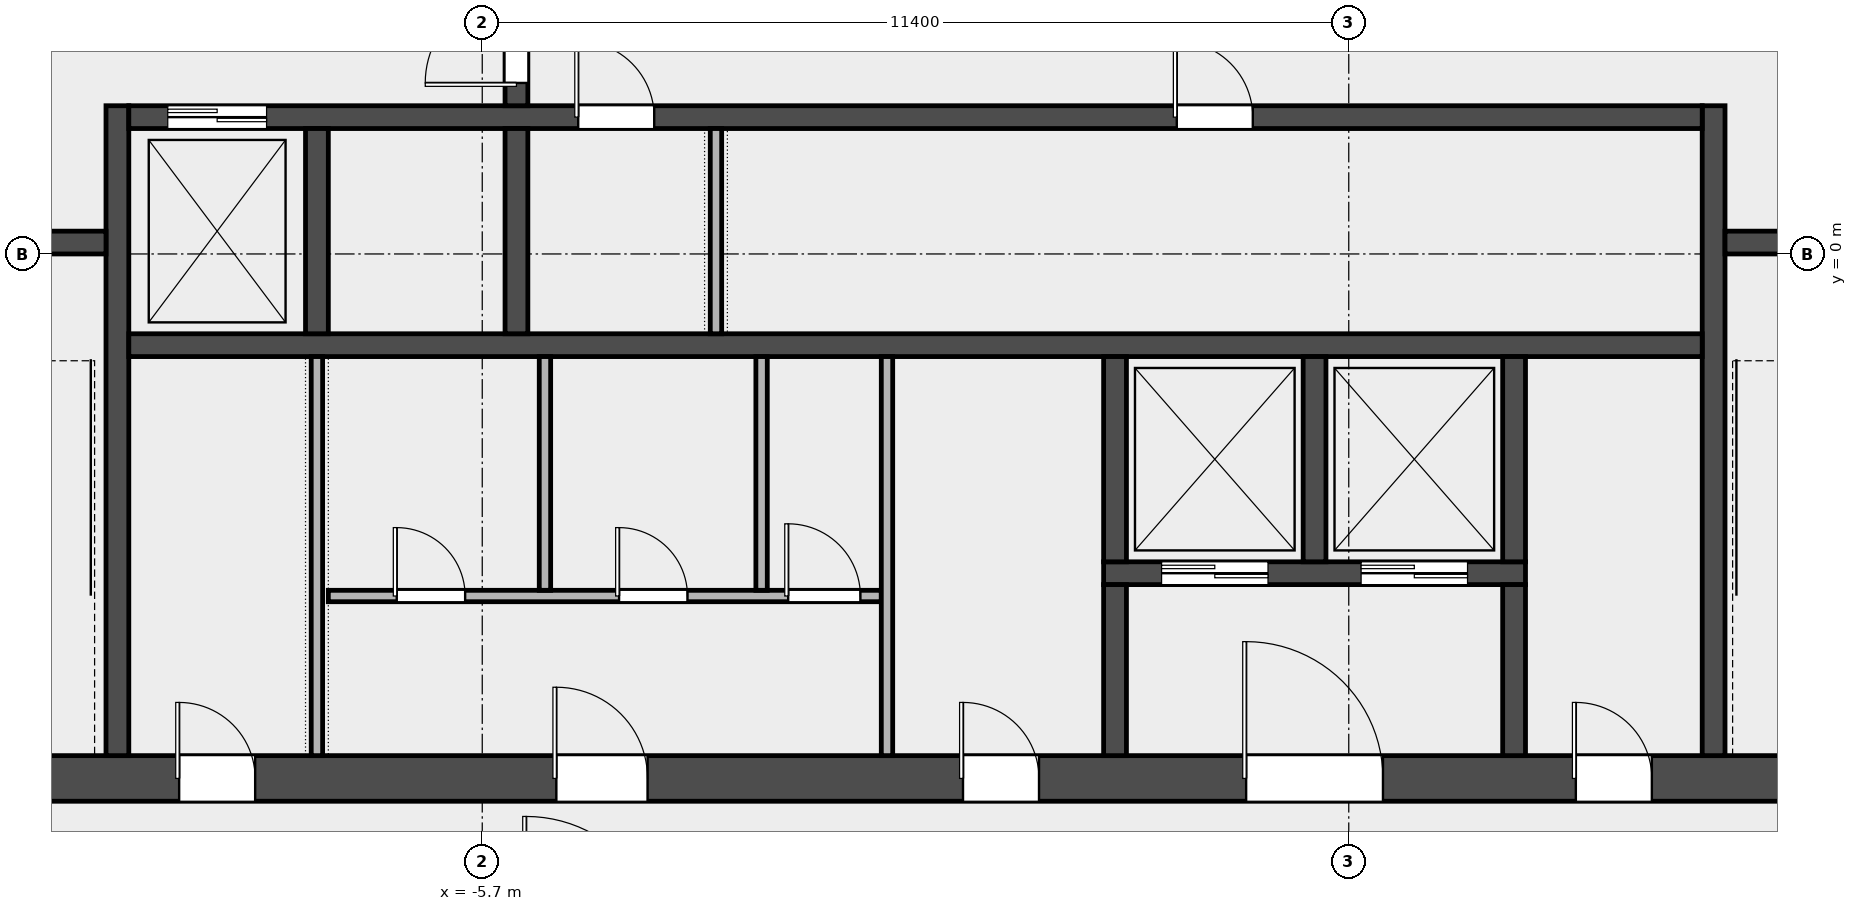
"""IFC4 building model, lengths in metres.
Left out: names, types, materials, properties, quantities, classifications, styles, units other than length and angle.
Written with IfcOpenShell. Run it as: python <this file> out.ifc"""

import sys

from ifc_helpers import new_model, si_unit, direction, frame, frame_2d, origin, place, context, subcontext, project, spatial, rectangle, extrude, element, fill, save


model = new_model("IFC4")
c1 = context("Model", 3, precision=1e-05, world=origin(), true_north=direction((0.0, 1.0)))
c2 = subcontext(c1, "Body", "Model", "MODEL_VIEW")
j1 = project(units=[si_unit("LENGTHUNIT", "METRE"), si_unit("PLANEANGLEUNIT", "RADIAN")], contexts=[c1])
p1 = place(None, origin())
s1 = spatial("IfcSite", under=j1, at=p1, CompositionType="ELEMENT")
p2 = place(p1, origin())
s2 = spatial("IfcBuilding", under=s1, at=p2, CompositionType="ELEMENT")
p3 = place(p2, frame((0.0, 0.0, 329.4)))
s3 = spatial("IfcBuildingStorey", under=s2, at=p3, CompositionType="ELEMENT", Elevation=329.4)
p4 = place(p3, frame((-14.4, -6.9, 0.0), z_axis=(0.0, 0.0, 1.0), x_axis=(1.0, 0.0, 0.0)))
e1 = element("IfcWall", 1, at=p4, inside=s3, PredefinedType="SHEAR", context=c2, shape_type="SweptSolid", body=[
    extrude(rectangle(XDim=28.8, YDim=0.6, at=frame_2d((14.4, 0.0))), origin(), (0.0, 0.0, 1.0), 3.7),
])
p5 = place(p4, frame((4.712, 0.0, 0.0)))
e2 = element("IfcOpeningElement", 2, at=p5, cuts=e1, PredefinedType="OPENING", context=c2, shape_type="SweptSolid", body=[
    extrude(rectangle(XDim=1.0, YDim=2.1, at=frame_2d((0.5, 1.05))), frame((0.0, 0.312, 0.0), z_axis=(0.0, -1.0, 0.0), x_axis=(1.0, 0.0, 0.0)), (0.0, 0.0, 1.0), 0.624),
])
p6 = place(p4, frame((9.675, 0.0, 0.0)))
e3 = element("IfcOpeningElement", 3, at=p6, cuts=e1, PredefinedType="OPENING", context=c2, shape_type="SweptSolid", body=[
    extrude(rectangle(XDim=1.2, YDim=2.1, at=frame_2d((0.6, 1.05))), frame((0.0, 0.312, 0.0), z_axis=(0.0, -1.0, 0.0), x_axis=(1.0, 0.0, 0.0)), (0.0, 0.0, 1.0), 0.624),
])
p7 = place(p4, frame((15.025, 0.0, 0.0)))
e4 = element("IfcOpeningElement", 4, at=p7, cuts=e1, PredefinedType="OPENING", context=c2, shape_type="SweptSolid", body=[
    extrude(rectangle(XDim=1.0, YDim=2.1, at=frame_2d((0.5, 1.05))), frame((0.0, 0.312, 0.0), z_axis=(0.0, -1.0, 0.0), x_axis=(1.0, 0.0, 0.0)), (0.0, 0.0, 1.0), 0.624),
])
p8 = place(p4, frame((18.75, 0.0, 0.0)))
e5 = element("IfcOpeningElement", 5, at=p8, cuts=e1, PredefinedType="OPENING", context=c2, shape_type="SweptSolid", body=[
    extrude(rectangle(XDim=1.8, YDim=2.1, at=frame_2d((0.9, 1.05))), frame((0.0, 0.312, 0.0), z_axis=(0.0, -1.0, 0.0), x_axis=(1.0, 0.0, 0.0)), (0.0, 0.0, 1.0), 0.624),
])
p9 = place(p4, frame((23.087, 0.0, 0.0)))
e6 = element("IfcOpeningElement", 6, at=p9, cuts=e1, PredefinedType="OPENING", context=c2, shape_type="SweptSolid", body=[
    extrude(rectangle(XDim=1.0, YDim=2.1, at=frame_2d((0.5, 1.05))), frame((0.0, 0.312, 0.0), z_axis=(0.0, -1.0, 0.0), x_axis=(1.0, 0.0, 0.0)), (0.0, 0.0, 1.0), 0.624),
])
for number, where, z_axis, x_axis in (
    (7, (-10.5, -6.6, 0.0), (0.0, 0.0, 1.0), (0.0, 1.0, 0.0)),
    (8, (10.5, -6.6, 0.0), (0.0, 0.0, 1.0), (0.0, 1.0, 0.0)),
):
    element("IfcWall", number, at=place(p3, frame(where, z_axis=z_axis, x_axis=x_axis)), inside=s3, PredefinedType="SHEAR", context=c2, shape_type="SweptSolid", body=[
        extrude(rectangle(XDim=8.55, YDim=0.3, at=frame_2d((4.275, 0.0))), origin(), (0.0, 0.0, 1.0), 3.7),
    ])
p10 = place(p3, frame((-13.8, 0.15, 0.0), z_axis=(0.0, 0.0, 1.0), x_axis=(1.0, 0.0, 0.0)))
e9 = element("IfcWall", 9, at=p10, inside=s3, PredefinedType="SOLIDWALL", context=c2, shape_type="SweptSolid", body=[
    extrude(rectangle(XDim=3.15, YDim=0.3, at=frame_2d((1.575, 0.0))), origin(), (0.0, 0.0, 1.0), 3.7),
])
p11 = place(p10, frame((0.975, 0.0, 0.0)))
e10 = element("IfcOpeningElement", 10, at=p11, cuts=e9, PredefinedType="OPENING", context=c2, shape_type="SweptSolid", body=[
    extrude(rectangle(XDim=1.1, YDim=2.1, at=frame_2d((0.55, 1.05))), frame((0.0, 0.162, 0.0), z_axis=(0.0, -1.0, 0.0), x_axis=(1.0, 0.0, 0.0)), (0.0, 0.0, 1.0), 0.324),
])
p12 = place(p3, frame((10.65, 0.15, 0.0), z_axis=(0.0, 0.0, 1.0), x_axis=(1.0, 0.0, 0.0)))
e11 = element("IfcWall", 11, at=p12, inside=s3, PredefinedType="SOLIDWALL", context=c2, shape_type="SweptSolid", body=[
    extrude(rectangle(XDim=3.15, YDim=0.3, at=frame_2d((1.575, 0.0))), origin(), (0.0, 0.0, 1.0), 3.7),
])
p13 = place(p12, frame((1.025, 0.0, 0.0)))
e12 = element("IfcOpeningElement", 12, at=p13, cuts=e11, PredefinedType="OPENING", context=c2, shape_type="SweptSolid", body=[
    extrude(rectangle(XDim=1.1, YDim=2.1, at=frame_2d((0.55, 1.05))), frame((0.0, 0.162, 0.0), z_axis=(0.0, -1.0, 0.0), x_axis=(1.0, 0.0, 0.0)), (0.0, 0.0, 1.0), 0.324),
])
p14 = place(p3, frame((-10.35, -1.2, 0.0), z_axis=(0.0, 0.0, 1.0), x_axis=(1.0, 0.0, 0.0)))
e13 = element("IfcWall", 13, at=p14, inside=s3, PredefinedType="SOLIDWALL", context=c2, shape_type="SweptSolid", body=[
    extrude(rectangle(XDim=20.7, YDim=0.3, at=frame_2d((10.35, 0.0))), origin(), (0.0, 0.0, 1.0), 3.7),
])
p15 = place(p3, frame((-10.35, 1.8, 0.0), z_axis=(0.0, 0.0, 1.0), x_axis=(1.0, 0.0, 0.0)))
e14 = element("IfcWall", 14, at=p15, inside=s3, PredefinedType="SOLIDWALL", context=c2, shape_type="SweptSolid", body=[
    extrude(rectangle(XDim=20.7, YDim=0.3, at=frame_2d((10.35, 0.0))), origin(), (0.0, 0.0, 1.0), 3.7),
])
p16 = place(p15, frame((0.512, 0.0, 0.0)))
e15 = element("IfcOpeningElement", 15, at=p16, cuts=e14, PredefinedType="OPENING", context=c2, shape_type="SweptSolid", body=[
    extrude(rectangle(XDim=1.3, YDim=2.1, at=frame_2d((0.65, 1.05))), frame((0.0, 0.162, 0.0), z_axis=(0.0, -1.0, 0.0), x_axis=(1.0, 0.0, 0.0)), (0.0, 0.0, 1.0), 0.324),
])
p17 = place(p15, frame((5.913, 0.0, 0.0)))
e16 = element("IfcOpeningElement", 16, at=p17, cuts=e14, PredefinedType="OPENING", context=c2, shape_type="SweptSolid", body=[
    extrude(rectangle(XDim=1.0, YDim=2.1, at=frame_2d((0.5, 1.05))), frame((0.0, 0.162, 0.0), z_axis=(0.0, -1.0, 0.0), x_axis=(1.0, 0.0, 0.0)), (0.0, 0.0, 1.0), 0.324),
])
p18 = place(p15, frame((13.788, 0.0, 0.0)))
e17 = element("IfcOpeningElement", 17, at=p18, cuts=e14, PredefinedType="OPENING", context=c2, shape_type="SweptSolid", body=[
    extrude(rectangle(XDim=1.0, YDim=2.1, at=frame_2d((0.5, 1.05))), frame((0.0, 0.162, 0.0), z_axis=(0.0, -1.0, 0.0), x_axis=(1.0, 0.0, 0.0)), (0.0, 0.0, 1.0), 0.324),
])
for number, where, z_axis, x_axis in (
    (18, (-7.875, -1.05, 0.0), (0.0, 0.0, 1.0), (0.0, 1.0, 0.0)),
    (19, (-5.25, -1.05, 0.0), (0.0, 0.0, 1.0), (0.0, 1.0, 0.0)),
):
    element("IfcWall", number, at=place(p3, frame(where, z_axis=z_axis, x_axis=x_axis)), inside=s3, PredefinedType="SOLIDWALL", context=c2, shape_type="SweptSolid", body=[
        extrude(rectangle(XDim=2.7, YDim=0.3, at=frame_2d((1.35, 0.0))), origin(), (0.0, 0.0, 1.0), 3.7),
    ])
p19 = place(p3, frame((-5.25, 1.95, 0.0), z_axis=(0.0, 0.0, 1.0), x_axis=(0.0, 1.0, 0.0)))
e20 = element("IfcWall", 20, at=p19, inside=s3, PredefinedType="SOLIDWALL", context=c2, shape_type="SweptSolid", body=[
    extrude(rectangle(XDim=3.3, YDim=0.3, at=frame_2d((1.65, 0.0))), origin(), (0.0, 0.0, 1.0), 3.7),
])
p20 = place(p19, frame((0.3, 0.0, 0.0)))
e21 = element("IfcOpeningElement", 21, at=p20, cuts=e20, PredefinedType="OPENING", context=c2, shape_type="SweptSolid", body=[
    extrude(rectangle(XDim=1.2, YDim=2.1, at=frame_2d((0.6, 1.05))), frame((0.0, 0.162, 0.0), z_axis=(0.0, -1.0, 0.0), x_axis=(1.0, 0.0, 0.0)), (0.0, 0.0, 1.0), 0.324),
])
p21 = place(p19, frame((1.8, 0.0, 0.0)))
e22 = element("IfcOpeningElement", 22, at=p21, cuts=e20, PredefinedType="OPENING", context=c2, shape_type="SweptSolid", body=[
    extrude(rectangle(XDim=1.2, YDim=2.1, at=frame_2d((0.6, 1.05))), frame((0.0, 0.162, 0.0), z_axis=(0.0, -1.0, 0.0), x_axis=(1.0, 0.0, 0.0)), (0.0, 0.0, 1.0), 0.324),
])
p22 = place(p3, frame((2.475, -4.2, 0.0), z_axis=(0.0, 0.0, 1.0), x_axis=(1.0, 0.0, 0.0)))
e23 = element("IfcWall", 23, at=p22, inside=s3, PredefinedType="SOLIDWALL", context=c2, shape_type="SweptSolid", body=[
    extrude(rectangle(XDim=5.55, YDim=0.3, at=frame_2d((2.775, 0.0))), origin(), (0.0, 0.0, 1.0), 3.7),
])
p23 = place(p22, frame((0.762, 0.0, 0.0)))
e24 = element("IfcOpeningElement", 24, at=p23, cuts=e23, PredefinedType="OPENING", context=c2, shape_type="SweptSolid", body=[
    extrude(rectangle(XDim=1.4, YDim=2.1, at=frame_2d((0.7, 1.05))), frame((0.0, 0.162, 0.0), z_axis=(0.0, -1.0, 0.0), x_axis=(1.0, 0.0, 0.0)), (0.0, 0.0, 1.0), 0.324),
])
p24 = place(p22, frame((3.387, 0.0, 0.0)))
e25 = element("IfcOpeningElement", 25, at=p24, cuts=e23, PredefinedType="OPENING", context=c2, shape_type="SweptSolid", body=[
    extrude(rectangle(XDim=1.4, YDim=2.1, at=frame_2d((0.7, 1.05))), frame((0.0, 0.162, 0.0), z_axis=(0.0, -1.0, 0.0), x_axis=(1.0, 0.0, 0.0)), (0.0, 0.0, 1.0), 0.324),
])
p25 = place(p3, frame((2.625, -4.05, 0.0), z_axis=(0.0, 0.0, 1.0), x_axis=(0.0, 1.0, 0.0)))
e26 = element("IfcWall", 26, at=p25, inside=s3, PredefinedType="SOLIDWALL", context=c2, shape_type="SweptSolid", body=[
    extrude(rectangle(XDim=2.7, YDim=0.3, at=frame_2d((1.35, 0.0))), origin(), (0.0, 0.0, 1.0), 3.7),
])
p26 = place(p3, frame((2.625, -6.6, 0.0), z_axis=(0.0, 0.0, 1.0), x_axis=(0.0, 1.0, 0.0)))
e27 = element("IfcWall", 27, at=p26, inside=s3, PredefinedType="SOLIDWALL", context=c2, shape_type="SweptSolid", body=[
    extrude(rectangle(XDim=2.25, YDim=0.3, at=frame_2d((1.125, 0.0))), origin(), (0.0, 0.0, 1.0), 3.7),
])
for number, where, z_axis, x_axis in (
    (28, (5.25, -4.05, 0.0), (0.0, 0.0, 1.0), (0.0, 1.0, 0.0)),
    (29, (7.875, -4.05, 0.0), (0.0, 0.0, 1.0), (0.0, 1.0, 0.0)),
):
    element("IfcWall", number, at=place(p3, frame(where, z_axis=z_axis, x_axis=x_axis)), inside=s3, PredefinedType="SOLIDWALL", context=c2, shape_type="SweptSolid", body=[
        extrude(rectangle(XDim=2.7, YDim=0.3, at=frame_2d((1.35, 0.0))), origin(), (0.0, 0.0, 1.0), 3.7),
    ])
p27 = place(p3, frame((7.875, -6.6, 0.0), z_axis=(0.0, 0.0, 1.0), x_axis=(0.0, 1.0, 0.0)))
e30 = element("IfcWall", 30, at=p27, inside=s3, PredefinedType="SOLIDWALL", context=c2, shape_type="SweptSolid", body=[
    extrude(rectangle(XDim=2.25, YDim=0.3, at=frame_2d((1.125, 0.0))), origin(), (0.0, 0.0, 1.0), 3.7),
])
p28 = place(p3, frame((-7.875, -6.6, 0.0), z_axis=(0.0, 0.0, 1.0), x_axis=(0.0, 1.0, 0.0)))
e31 = element("IfcWall", 31, at=p28, inside=s3, PredefinedType="PARTITIONING", context=c2, shape_type="SweptSolid", body=[
    extrude(rectangle(XDim=5.25, YDim=0.15, at=frame_2d((2.625, 0.0))), origin(), (0.0, 0.0, 1.0), 3.7),
])
p29 = place(p3, frame((-7.725, -4.5, 0.0), z_axis=(0.0, 0.0, 1.0), x_axis=(1.0, 0.0, 0.0)))
e32 = element("IfcWall", 32, at=p29, inside=s3, PredefinedType="PARTITIONING", context=c2, shape_type="SweptSolid", body=[
    extrude(rectangle(XDim=7.275, YDim=0.15, at=frame_2d((3.638, 0.0))), origin(), (0.0, 0.0, 1.0), 3.7),
])
p30 = place(p29, frame((0.9, 0.0, 0.0)))
e33 = element("IfcOpeningElement", 33, at=p30, cuts=e32, PredefinedType="OPENING", context=c2, shape_type="SweptSolid", body=[
    extrude(rectangle(XDim=0.9, YDim=2.1, at=frame_2d((0.45, 1.05))), frame((0.0, 0.087, 0.0), z_axis=(0.0, -1.0, 0.0), x_axis=(1.0, 0.0, 0.0)), (0.0, 0.0, 1.0), 0.174),
])
p31 = place(p29, frame((3.825, 0.0, 0.0)))
e34 = element("IfcOpeningElement", 34, at=p31, cuts=e32, PredefinedType="OPENING", context=c2, shape_type="SweptSolid", body=[
    extrude(rectangle(XDim=0.9, YDim=2.1, at=frame_2d((0.45, 1.05))), frame((0.0, 0.087, 0.0), z_axis=(0.0, -1.0, 0.0), x_axis=(1.0, 0.0, 0.0)), (0.0, 0.0, 1.0), 0.174),
])
p32 = place(p29, frame((6.05, 0.0, 0.0)))
e35 = element("IfcOpeningElement", 35, at=p32, cuts=e32, PredefinedType="OPENING", context=c2, shape_type="SweptSolid", body=[
    extrude(rectangle(XDim=0.95, YDim=2.1, at=frame_2d((0.475, 1.05))), frame((0.0, 0.087, 0.0), z_axis=(0.0, -1.0, 0.0), x_axis=(1.0, 0.0, 0.0)), (0.0, 0.0, 1.0), 0.174),
])
for number, where, z_axis, x_axis in (
    (36, (-4.875, -4.425, 0.0), (0.0, 0.0, 1.0), (0.0, 1.0, 0.0)),
    (37, (-2.025, -4.425, 0.0), (0.0, 0.0, 1.0), (0.0, 1.0, 0.0)),
):
    element("IfcWall", number, at=place(p3, frame(where, z_axis=z_axis, x_axis=x_axis)), inside=s3, PredefinedType="PARTITIONING", context=c2, shape_type="SweptSolid", body=[
        extrude(rectangle(XDim=3.075, YDim=0.15, at=frame_2d((1.538, 0.0))), origin(), (0.0, 0.0, 1.0), 3.7),
    ])
p33 = place(p3, frame((-0.375, -6.6, 0.0), z_axis=(0.0, 0.0, 1.0), x_axis=(0.0, 1.0, 0.0)))
e38 = element("IfcWall", 38, at=p33, inside=s3, PredefinedType="PARTITIONING", context=c2, shape_type="SweptSolid", body=[
    extrude(rectangle(XDim=5.25, YDim=0.15, at=frame_2d((2.625, 0.0))), origin(), (0.0, 0.0, 1.0), 3.7),
])
p34 = place(p3, frame((-2.625, -1.05, 0.0), z_axis=(0.0, 0.0, 1.0), x_axis=(0.0, 1.0, 0.0)))
e39 = element("IfcWall", 39, at=p34, inside=s3, PredefinedType="PARTITIONING", context=c2, shape_type="SweptSolid", body=[
    extrude(rectangle(XDim=2.7, YDim=0.15, at=frame_2d((1.35, 0.0))), origin(), (0.0, 0.0, 1.0), 3.7),
])
p35 = place(p20, origin())
e40 = element("IfcDoor", 40, at=p35, inside=s3, OperationType="SINGLE_SWING_LEFT", PredefinedType="DOOR", context=c2, shape_type="SweptSolid", body=[
    extrude(rectangle(XDim=1.2, YDim=2.1, at=frame_2d((0.6, 1.05))), frame((0.0, 0.025, 0.0), z_axis=(0.0, -1.0, 0.0), x_axis=(1.0, 0.0, 0.0)), (0.0, 0.0, 1.0), 0.05),
])
fill(e21, e40)
p36 = place(p16, origin())
e41 = element("IfcDoor", 41, at=p36, inside=s3, OperationType="DOUBLE_DOOR_SLIDING", PredefinedType="DOOR", context=c2, shape_type="SweptSolid", body=[
    extrude(rectangle(XDim=1.3, YDim=2.1, at=frame_2d((0.65, 1.05))), frame((0.0, 0.025, 0.0), z_axis=(0.0, -1.0, 0.0), x_axis=(1.0, 0.0, 0.0)), (0.0, 0.0, 1.0), 0.05),
])
fill(e15, e41)
p37 = place(p23, origin())
e42 = element("IfcDoor", 42, at=p37, inside=s3, OperationType="DOUBLE_DOOR_SLIDING", PredefinedType="DOOR", context=c2, shape_type="SweptSolid", body=[
    extrude(rectangle(XDim=1.4, YDim=2.1, at=frame_2d((0.7, 1.05))), frame((0.0, 0.025, 0.0), z_axis=(0.0, -1.0, 0.0), x_axis=(1.0, 0.0, 0.0)), (0.0, 0.0, 1.0), 0.05),
])
fill(e24, e42)
p38 = place(p24, origin())
e43 = element("IfcDoor", 43, at=p38, inside=s3, OperationType="DOUBLE_DOOR_SLIDING", PredefinedType="DOOR", context=c2, shape_type="SweptSolid", body=[
    extrude(rectangle(XDim=1.4, YDim=2.1, at=frame_2d((0.7, 1.05))), frame((0.0, 0.025, 0.0), z_axis=(0.0, -1.0, 0.0), x_axis=(1.0, 0.0, 0.0)), (0.0, 0.0, 1.0), 0.05),
])
fill(e25, e43)
p39 = place(p5, origin())
e44 = element("IfcDoor", 44, at=p39, inside=s3, OperationType="SINGLE_SWING_LEFT", PredefinedType="DOOR", context=c2, shape_type="SweptSolid", body=[
    extrude(rectangle(XDim=1.0, YDim=2.1, at=frame_2d((0.5, 1.05))), frame((0.0, 0.025, 0.0), z_axis=(0.0, -1.0, 0.0), x_axis=(1.0, 0.0, 0.0)), (0.0, 0.0, 1.0), 0.05),
])
fill(e2, e44)
p40 = place(p6, origin())
e45 = element("IfcDoor", 45, at=p40, inside=s3, OperationType="SINGLE_SWING_LEFT", PredefinedType="DOOR", context=c2, shape_type="SweptSolid", body=[
    extrude(rectangle(XDim=1.2, YDim=2.1, at=frame_2d((0.6, 1.05))), frame((0.0, 0.025, 0.0), z_axis=(0.0, -1.0, 0.0), x_axis=(1.0, 0.0, 0.0)), (0.0, 0.0, 1.0), 0.05),
])
fill(e3, e45)
p41 = place(p30, origin())
e46 = element("IfcDoor", 46, at=p41, inside=s3, OperationType="SINGLE_SWING_LEFT", PredefinedType="DOOR", context=c2, shape_type="SweptSolid", body=[
    extrude(rectangle(XDim=0.9, YDim=2.1, at=frame_2d((0.45, 1.05))), frame((0.0, 0.025, 0.0), z_axis=(0.0, -1.0, 0.0), x_axis=(1.0, 0.0, 0.0)), (0.0, 0.0, 1.0), 0.05),
])
fill(e33, e46)
p42 = place(p31, origin())
e47 = element("IfcDoor", 47, at=p42, inside=s3, OperationType="SINGLE_SWING_LEFT", PredefinedType="DOOR", context=c2, shape_type="SweptSolid", body=[
    extrude(rectangle(XDim=0.9, YDim=2.1, at=frame_2d((0.45, 1.05))), frame((0.0, 0.025, 0.0), z_axis=(0.0, -1.0, 0.0), x_axis=(1.0, 0.0, 0.0)), (0.0, 0.0, 1.0), 0.05),
])
fill(e34, e47)
p43 = place(p32, origin())
e48 = element("IfcDoor", 48, at=p43, inside=s3, OperationType="SINGLE_SWING_LEFT", PredefinedType="DOOR", context=c2, shape_type="SweptSolid", body=[
    extrude(rectangle(XDim=0.95, YDim=2.1, at=frame_2d((0.475, 1.05))), frame((0.0, 0.025, 0.0), z_axis=(0.0, -1.0, 0.0), x_axis=(1.0, 0.0, 0.0)), (0.0, 0.0, 1.0), 0.05),
])
fill(e35, e48)
p44 = place(p7, origin())
e49 = element("IfcDoor", 49, at=p44, inside=s3, OperationType="SINGLE_SWING_LEFT", PredefinedType="DOOR", context=c2, shape_type="SweptSolid", body=[
    extrude(rectangle(XDim=1.0, YDim=2.1, at=frame_2d((0.5, 1.05))), frame((0.0, 0.025, 0.0), z_axis=(0.0, -1.0, 0.0), x_axis=(1.0, 0.0, 0.0)), (0.0, 0.0, 1.0), 0.05),
])
fill(e4, e49)
p45 = place(p8, origin())
e50 = element("IfcDoor", 50, at=p45, inside=s3, OperationType="DOUBLE_DOOR_SINGLE_SWING", PredefinedType="DOOR", context=c2, shape_type="SweptSolid", body=[
    extrude(rectangle(XDim=1.8, YDim=2.1, at=frame_2d((0.9, 1.05))), frame((0.0, 0.025, 0.0), z_axis=(0.0, -1.0, 0.0), x_axis=(1.0, 0.0, 0.0)), (0.0, 0.0, 1.0), 0.05),
])
fill(e5, e50)
p46 = place(p9, origin())
e51 = element("IfcDoor", 51, at=p46, inside=s3, OperationType="SINGLE_SWING_LEFT", PredefinedType="DOOR", context=c2, shape_type="SweptSolid", body=[
    extrude(rectangle(XDim=1.0, YDim=2.1, at=frame_2d((0.5, 1.05))), frame((0.0, 0.025, 0.0), z_axis=(0.0, -1.0, 0.0), x_axis=(1.0, 0.0, 0.0)), (0.0, 0.0, 1.0), 0.05),
])
fill(e6, e51)
p47 = place(p17, origin())
e52 = element("IfcDoor", 52, at=p47, inside=s3, OperationType="SINGLE_SWING_LEFT", PredefinedType="DOOR", context=c2, shape_type="SweptSolid", body=[
    extrude(rectangle(XDim=1.0, YDim=2.1, at=frame_2d((0.5, 1.05))), frame((0.0, 0.025, 0.0), z_axis=(0.0, -1.0, 0.0), x_axis=(1.0, 0.0, 0.0)), (0.0, 0.0, 1.0), 0.05),
])
fill(e16, e52)
p48 = place(p18, origin())
e53 = element("IfcDoor", 53, at=p48, inside=s3, OperationType="SINGLE_SWING_LEFT", PredefinedType="DOOR", context=c2, shape_type="SweptSolid", body=[
    extrude(rectangle(XDim=1.0, YDim=2.1, at=frame_2d((0.5, 1.05))), frame((0.0, 0.025, 0.0), z_axis=(0.0, -1.0, 0.0), x_axis=(1.0, 0.0, 0.0)), (0.0, 0.0, 1.0), 0.05),
])
fill(e17, e53)
save(model, sys.argv[1])
